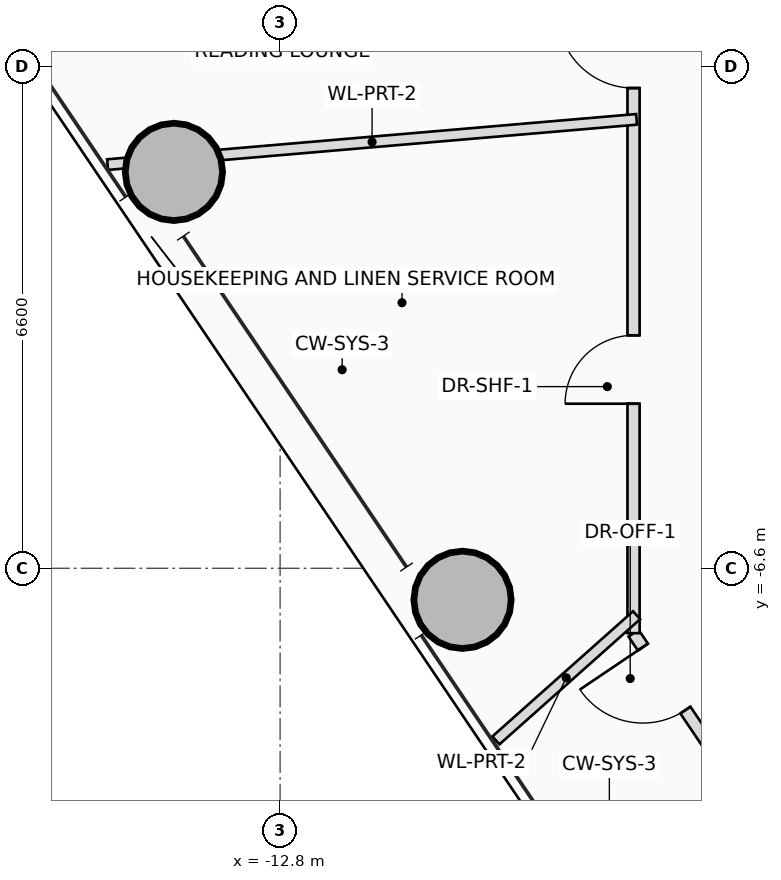
"""IFC4 building model, lengths in metres.
Left out: names, types, materials, properties, quantities, classifications, styles, units other than length and angle.
Written with IfcOpenShell. Run it as: python <this file> out.ifc"""

import sys

from ifc_helpers import new_model, si_unit, direction, frame, frame_2d, origin, origin_2d, place, context, subcontext, project, spatial, rectangle, hollow_circle, extrude, source, transform, mapped, element, fill, save


model = new_model("IFC4")
c1 = context("Model", 3, precision=1e-05, world=origin(), true_north=direction((0.0, 1.0)))
c2 = subcontext(c1, "Body", "Model", "MODEL_VIEW")
j1 = project(units=[si_unit("LENGTHUNIT", "METRE"), si_unit("PLANEANGLEUNIT", "RADIAN")], contexts=[c1])
p1 = place(None, origin())
s1 = spatial("IfcSite", under=j1, at=p1, CompositionType="ELEMENT")
p2 = place(p1, origin())
s2 = spatial("IfcBuilding", under=s1, at=p2, CompositionType="ELEMENT")
p3 = place(p2, frame((0.0, 0.0, 179.45)))
s3 = spatial("IfcBuildingStorey", under=s2, at=p3, CompositionType="ELEMENT", Elevation=179.45)
m1 = source(origin(), c2, "Body", "SweptSolid", [
    extrude(hollow_circle(Radius=0.65, WallThickness=0.045, at=origin_2d()), origin(), (0.0, 0.0, 1.0), 3.45),
])
for number, where, z_axis, x_axis in (
    (1, (-14.198, -1.385, 0.0), (0.0, 0.0, 1.0), (1.0, 0.0, 0.0)),
    (2, (-10.4, -7.015, 0.0), (0.0, 0.0, 1.0), (1.0, 0.0, 0.0)),
):
    element("IfcColumn", number, at=place(p3, frame(where, z_axis=z_axis, x_axis=x_axis)), inside=s3, PredefinedType="COLUMN", context=c2, shape_type="MappedRepresentation", body=[
        mapped(m1, transform((0.0, 0.0, 0.0), scale=1.0)),
    ])
p4 = place(p3, frame((-6.36, -10.107, 0.0), z_axis=(0.0, 0.0, 1.0), x_axis=(-0.559145325895, 0.829069662049, 0.0)))
e3 = element("IfcWall", 3, at=p4, inside=s3, PredefinedType="PARTITIONING", context=c2, shape_type="SweptSolid", body=[
    extrude(rectangle(XDim=3.201, YDim=0.16, at=frame_2d((1.601, 0.0))), origin(), (0.0, 0.0, 1.0), 2.605),
])
p5 = place(p4, frame((1.981, 0.0, 0.0)))
e4 = element("IfcOpeningElement", 4, at=p5, cuts=e3, PredefinedType="OPENING", context=c2, shape_type="SweptSolid", body=[
    extrude(rectangle(XDim=1.0, YDim=2.25, at=frame_2d((0.5, 1.125))), frame((0.0, 0.09, 0.0), z_axis=(0.0, -1.0, 0.0), x_axis=(1.0, 0.0, 0.0)), (0.0, 0.0, 1.0), 0.18),
])
p6 = place(p3, frame((-8.15, -7.454, 0.0), z_axis=(0.0, 0.0, 1.0), x_axis=(0.0, 1.0, 0.0)))
e5 = element("IfcWall", 5, at=p6, inside=s3, PredefinedType="PARTITIONING", context=c2, shape_type="SweptSolid", body=[
    extrude(rectangle(XDim=15.054, YDim=0.16, at=frame_2d((7.527, 0.0))), origin(), (0.0, 0.0, 1.0), 2.605),
])
p7 = place(p6, frame((3.019, 0.0, 0.0)))
e6 = element("IfcOpeningElement", 6, at=p7, cuts=e5, PredefinedType="OPENING", context=c2, shape_type="SweptSolid", body=[
    extrude(rectangle(XDim=0.9, YDim=2.05, at=frame_2d((0.45, 1.025))), frame((0.0, 0.09, 0.0), z_axis=(0.0, -1.0, 0.0), x_axis=(1.0, 0.0, 0.0)), (0.0, 0.0, 1.0), 0.18),
])
p8 = place(p6, frame((7.172, 0.0, 0.0)))
e7 = element("IfcOpeningElement", 7, at=p8, cuts=e5, PredefinedType="OPENING", context=c2, shape_type="SweptSolid", body=[
    extrude(rectangle(XDim=1.0, YDim=2.25, at=frame_2d((0.5, 1.125))), frame((0.0, 0.09, 0.0), z_axis=(0.0, -1.0, 0.0), x_axis=(1.0, 0.0, 0.0)), (0.0, 0.0, 1.0), 0.18),
])
p9 = place(p6, frame((10.563, 0.0, 0.0)))
e8 = element("IfcOpeningElement", 8, at=p9, cuts=e5, PredefinedType="OPENING", context=c2, shape_type="SweptSolid", body=[
    extrude(rectangle(XDim=1.05, YDim=2.2, at=frame_2d((0.525, 1.1))), frame((0.0, 0.09, 0.0), z_axis=(0.0, -1.0, 0.0), x_axis=(1.0, 0.0, 0.0)), (0.0, 0.0, 1.0), 0.18),
])
p10 = place(p3, frame((-8.11, -0.694, 0.0), z_axis=(0.0, 0.0, 1.0), x_axis=(-0.996360400447, -0.085240556199, 0.0)))
e9 = element("IfcWall", 9, at=p10, inside=s3, PredefinedType="PARTITIONING", context=c2, shape_type="SweptSolid", body=[
    extrude(rectangle(XDim=6.986, YDim=0.14, at=frame_2d((3.493, 0.0))), origin(), (0.0, 0.0, 1.0), 2.805),
])
p11 = place(p3, frame((-8.11, -7.217, 0.0), z_axis=(0.0, 0.0, 1.0), x_axis=(-0.747006826924, -0.66481636602, 0.0)))
e10 = element("IfcWall", 10, at=p11, inside=s3, PredefinedType="PARTITIONING", context=c2, shape_type="SweptSolid", body=[
    extrude(rectangle(XDim=2.477, YDim=0.14, at=frame_2d((1.239, 0.0))), origin(), (0.0, 0.0, 1.0), 2.765),
])
p12 = place(p3, frame((-6.755, -9.45, 0.0), z_axis=(0.0, 0.0, 1.0), x_axis=(-0.581461082044, -0.813574219152, 0.0)))
e11 = element("IfcWall", 11, at=p12, inside=s3, PredefinedType="PARTITIONING", context=c2, shape_type="SweptSolid", body=[
    extrude(rectangle(XDim=2.487, YDim=0.14, at=frame_2d((1.243, 0.0))), origin(), (0.0, 0.0, 1.0), 2.765),
])
p13 = place(p5, origin())
e12 = element("IfcDoor", 12, at=p13, inside=s3, OperationType="SINGLE_SWING_RIGHT", PredefinedType="DOOR", context=c2, shape_type="SweptSolid", body=[
    extrude(rectangle(XDim=1.0, YDim=2.25, at=frame_2d((0.5, 1.125))), frame((0.0, 0.025, 0.0), z_axis=(0.0, -1.0, 0.0), x_axis=(1.0, 0.0, 0.0)), (0.0, 0.0, 1.0), 0.05),
])
fill(e4, e12)
p14 = place(p7, origin())
e13 = element("IfcDoor", 13, at=p14, inside=s3, OperationType="SINGLE_SWING_LEFT", PredefinedType="DOOR", context=c2, shape_type="SweptSolid", body=[
    extrude(rectangle(XDim=0.9, YDim=2.05, at=frame_2d((0.45, 1.025))), frame((0.0, 0.025, 0.0), z_axis=(0.0, -1.0, 0.0), x_axis=(1.0, 0.0, 0.0)), (0.0, 0.0, 1.0), 0.05),
])
fill(e6, e13)
p15 = place(p8, origin())
e14 = element("IfcDoor", 14, at=p15, inside=s3, OperationType="SINGLE_SWING_RIGHT", PredefinedType="DOOR", context=c2, shape_type="SweptSolid", body=[
    extrude(rectangle(XDim=1.0, YDim=2.25, at=frame_2d((0.5, 1.125))), frame((0.0, 0.025, 0.0), z_axis=(0.0, -1.0, 0.0), x_axis=(1.0, 0.0, 0.0)), (0.0, 0.0, 1.0), 0.05),
])
fill(e7, e14)
save(model, sys.argv[1])
